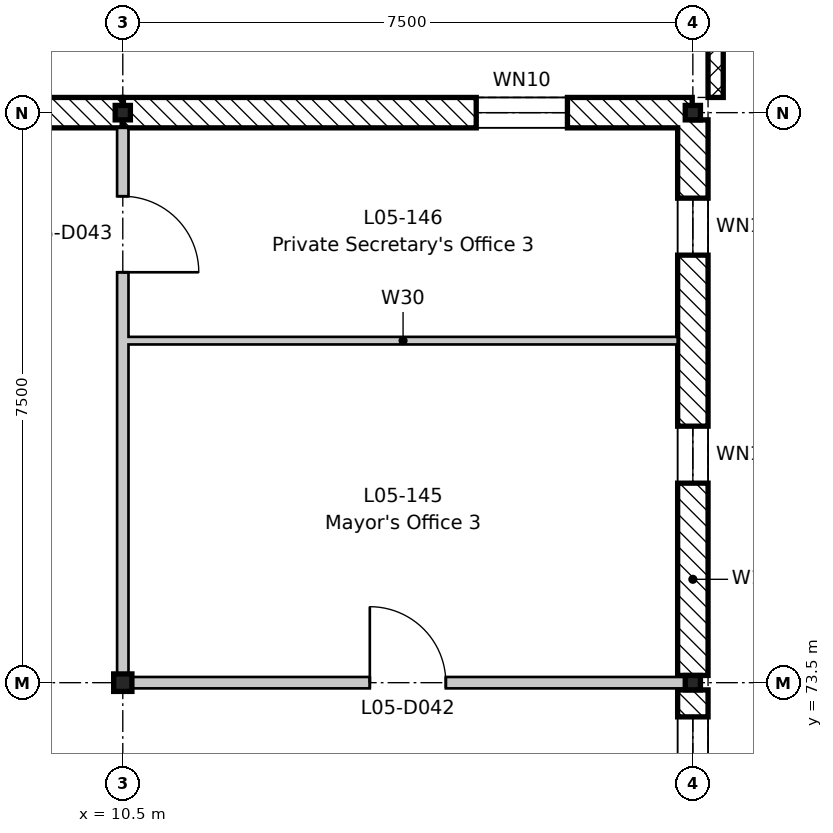
"""IFC4 building model, lengths in metres.
Left out: names, types, materials, properties, quantities, classifications, styles, units other than length and angle.
Written with IfcOpenShell. Run it as: python <this file> out.ifc"""

import sys

from ifc_helpers import new_model, si_unit, direction, frame, frame_2d, origin, origin_2d, place, context, subcontext, project, spatial, rectangle, i_section, extrude, element, fill, save


model = new_model("IFC4")
c1 = context("Model", 3, precision=1e-05, world=origin(), true_north=direction((0.0, 1.0)))
c2 = subcontext(c1, "Body", "Model", "MODEL_VIEW")
j1 = project(units=[si_unit("LENGTHUNIT", "METRE"), si_unit("PLANEANGLEUNIT", "RADIAN")], contexts=[c1])
p1 = place(None, origin())
s1 = spatial("IfcSite", under=j1, at=p1, CompositionType="ELEMENT")
p2 = place(p1, origin())
s2 = spatial("IfcBuilding", under=s1, at=p2, CompositionType="ELEMENT")
p3 = place(p2, frame((0.0, 0.0, 22.8)))
s3 = spatial("IfcBuildingStorey", under=s2, at=p3, CompositionType="ELEMENT", Elevation=22.8)
p4 = place(p3, frame((10.5, 73.5, -0.2), z_axis=(0.0, 0.0, 1.0), x_axis=(1.0, 0.0, 0.0)))
e1 = element("IfcColumn", 1, at=p4, inside=s3, PredefinedType="COLUMN", context=c2, shape_type="SweptSolid", body=[
    extrude(i_section(OverallWidth=0.24, OverallDepth=0.23, WebThickness=0.008, FlangeThickness=0.012, FilletRadius=0.021, at=origin_2d()), origin(), (0.0, 0.0, 1.0), 4.15),
])
for number, where, z_axis, x_axis in (
    (2, (10.5, 81.0, -0.2), (0.0, 0.0, 1.0), (1.0, 0.0, 0.0)),
    (3, (18.0, 73.5, -0.2), (0.0, 0.0, 1.0), (1.0, 0.0, 0.0)),
    (4, (18.0, 81.0, -0.2), (0.0, 0.0, 1.0), (1.0, 0.0, 0.0)),
):
    element("IfcColumn", number, at=place(p3, frame(where, z_axis=z_axis, x_axis=x_axis)), inside=s3, PredefinedType="COLUMN", context=c2, shape_type="SweptSolid", body=[
        extrude(i_section(OverallWidth=0.2, OverallDepth=0.19, WebThickness=0.007, FlangeThickness=0.01, FilletRadius=0.018, at=origin_2d()), origin(), (0.0, 0.0, 1.0), 4.15),
    ])
p5 = place(p3, frame((7.508, 81.0, 0.0), z_axis=(0.0, 0.0, 1.0), x_axis=(1.0, 0.0, 0.0)))
e5 = element("IfcWall", 5, at=p5, inside=s3, PredefinedType="STANDARD", context=c2, shape_type="SweptSolid", body=[
    extrude(rectangle(XDim=2.983, YDim=0.4, at=frame_2d((1.492, 0.0))), origin(), (0.0, 0.0, 1.0), 3.75),
])
p6 = place(p3, frame((10.508, 81.0, 0.0), z_axis=(0.0, 0.0, 1.0), x_axis=(1.0, 0.0, 0.0)))
e6 = element("IfcWall", 6, at=p6, inside=s3, PredefinedType="STANDARD", context=c2, shape_type="SweptSolid", body=[
    extrude(rectangle(XDim=7.483, YDim=0.4, at=frame_2d((3.742, 0.0))), origin(), (0.0, 0.0, 1.0), 3.62),
])
p7 = place(p6, frame((4.642, 0.0, 0.6)))
e7 = element("IfcOpeningElement", 7, at=p7, cuts=e6, PredefinedType="OPENING", context=c2, shape_type="SweptSolid", body=[
    extrude(rectangle(XDim=1.2, YDim=1.8, at=frame_2d((0.6, 0.9))), frame((0.0, 0.21, 0.0), z_axis=(0.0, -1.0, 0.0), x_axis=(1.0, 0.0, 0.0)), (0.0, 0.0, 1.0), 0.42),
])
p8 = place(p3, frame((18.0, 73.405, 0.0), z_axis=(0.0, 0.0, 1.0), x_axis=(0.0, -1.0, 0.0)))
e8 = element("IfcWall", 8, at=p8, inside=s3, PredefinedType="STANDARD", context=c2, shape_type="SweptSolid", body=[
    extrude(rectangle(XDim=2.81, YDim=0.4, at=frame_2d((1.405, 0.0))), origin(), (0.0, 0.0, 1.0), 3.68),
])
p9 = place(p8, frame((0.355, 0.0, 0.9)))
e9 = element("IfcOpeningElement", 9, at=p9, cuts=e8, PredefinedType="OPENING", context=c2, shape_type="SweptSolid", body=[
    extrude(rectangle(XDim=2.1, YDim=2.1, at=frame_2d((1.05, 1.05))), frame((0.0, 0.21, 0.0), z_axis=(0.0, -1.0, 0.0), x_axis=(1.0, 0.0, 0.0)), (0.0, 0.0, 1.0), 0.42),
])
p10 = place(p3, frame((18.0, 80.905, 0.0), z_axis=(0.0, 0.0, 1.0), x_axis=(0.0, -1.0, 0.0)))
e10 = element("IfcWall", 10, at=p10, inside=s3, PredefinedType="STANDARD", context=c2, shape_type="SweptSolid", body=[
    extrude(rectangle(XDim=7.31, YDim=0.4, at=frame_2d((3.655, 0.0))), origin(), (0.0, 0.0, 1.0), 3.55),
])
p11 = place(p10, frame((4.03, 0.0, 1.5)))
e11 = element("IfcOpeningElement", 11, at=p11, cuts=e10, PredefinedType="OPENING", context=c2, shape_type="SweptSolid", body=[
    extrude(rectangle(XDim=0.75, YDim=1.2, at=frame_2d((0.375, 0.6))), frame((0.0, 0.21, 0.0), z_axis=(0.0, -1.0, 0.0), x_axis=(1.0, 0.0, 0.0)), (0.0, 0.0, 1.0), 0.42),
])
p12 = place(p10, frame((1.03, 0.0, 1.5)))
e12 = element("IfcOpeningElement", 12, at=p12, cuts=e10, PredefinedType="OPENING", context=c2, shape_type="SweptSolid", body=[
    extrude(rectangle(XDim=0.75, YDim=1.2, at=frame_2d((0.375, 0.6))), frame((0.0, 0.21, 0.0), z_axis=(0.0, -1.0, 0.0), x_axis=(1.0, 0.0, 0.0)), (0.0, 0.0, 1.0), 0.42),
])
p13 = place(p3, frame((18.3, 81.2, 0.0), z_axis=(0.0, 0.0, 1.0), x_axis=(0.0, 1.0, 0.0)))
e13 = element("IfcWall", 13, at=p13, inside=s3, PredefinedType="PARAPET", context=c2, shape_type="SweptSolid", body=[
    extrude(rectangle(XDim=1.5, YDim=0.2, at=frame_2d((0.75, 0.0))), origin(), (0.0, 0.0, 1.0), 0.9),
])
p14 = place(p3, frame((10.5, 73.5, 0.0), z_axis=(0.0, 0.0, 1.0), x_axis=(0.0, 1.0, 0.0)))
e14 = element("IfcWall", 14, at=p14, inside=s3, PredefinedType="PARTITIONING", context=c2, shape_type="SweptSolid", body=[
    extrude(rectangle(XDim=7.3, YDim=0.15, at=frame_2d((3.65, 0.0))), origin(), (0.0, 0.0, 1.0), 3.43),
])
p15 = place(p14, frame((5.4, 0.0, 0.0)))
e15 = element("IfcOpeningElement", 15, at=p15, cuts=e14, PredefinedType="OPENING", context=c2, shape_type="SweptSolid", body=[
    extrude(rectangle(XDim=1.0, YDim=2.1, at=frame_2d((0.5, 1.05))), frame((0.0, 0.085, 0.0), z_axis=(0.0, -1.0, 0.0), x_axis=(1.0, 0.0, 0.0)), (0.0, 0.0, 1.0), 0.17),
])
p16 = place(p3, frame((10.575, 73.5, 0.0), z_axis=(0.0, 0.0, 1.0), x_axis=(1.0, 0.0, 0.0)))
e16 = element("IfcWall", 16, at=p16, inside=s3, PredefinedType="PARTITIONING", context=c2, shape_type="SweptSolid", body=[
    extrude(rectangle(XDim=7.425, YDim=0.15, at=frame_2d((3.712, 0.0))), origin(), (0.0, 0.0, 1.0), 3.6),
])
p17 = place(p16, frame((3.175, 0.0, 0.0)))
e17 = element("IfcOpeningElement", 17, at=p17, cuts=e16, PredefinedType="OPENING", context=c2, shape_type="SweptSolid", body=[
    extrude(rectangle(XDim=1.0, YDim=2.1, at=frame_2d((0.5, 1.05))), frame((0.0, 0.085, 0.0), z_axis=(0.0, -1.0, 0.0), x_axis=(1.0, 0.0, 0.0)), (0.0, 0.0, 1.0), 0.17),
])
p18 = place(p3, frame((10.575, 78.0, 0.0), z_axis=(0.0, 0.0, 1.0), x_axis=(1.0, 0.0, 0.0)))
e18 = element("IfcWall", 18, at=p18, inside=s3, PredefinedType="PARTITIONING", context=c2, shape_type="SweptSolid", body=[
    extrude(rectangle(XDim=7.225, YDim=0.1, at=frame_2d((3.613, 0.0))), origin(), (0.0, 0.0, 1.0), 3.95),
])
p19 = place(p7, origin())
e19 = element("IfcWindow", 19, at=p19, inside=s3, PartitioningType="SINGLE_PANEL", PredefinedType="WINDOW", context=c2, shape_type="SweptSolid", body=[
    extrude(rectangle(XDim=1.2, YDim=1.8, at=frame_2d((0.6, 0.9))), frame((0.0, 0.03, 0.0), z_axis=(0.0, -1.0, 0.0), x_axis=(1.0, 0.0, 0.0)), (0.0, 0.0, 1.0), 0.06),
])
fill(e7, e19)
p20 = place(p9, origin())
e20 = element("IfcWindow", 20, at=p20, inside=s3, PartitioningType="SINGLE_PANEL", PredefinedType="WINDOW", context=c2, shape_type="SweptSolid", body=[
    extrude(rectangle(XDim=2.1, YDim=2.1, at=frame_2d((1.05, 1.05))), frame((0.0, -0.12, 0.0), z_axis=(0.0, -1.0, 0.0), x_axis=(1.0, 0.0, 0.0)), (0.0, 0.0, 1.0), 0.06),
])
fill(e9, e20)
p21 = place(p11, origin())
e21 = element("IfcWindow", 21, at=p21, inside=s3, PartitioningType="SINGLE_PANEL", PredefinedType="WINDOW", context=c2, shape_type="SweptSolid", body=[
    extrude(rectangle(XDim=0.75, YDim=1.2, at=frame_2d((0.375, 0.6))), frame((0.0, -0.12, 0.0), z_axis=(0.0, -1.0, 0.0), x_axis=(1.0, 0.0, 0.0)), (0.0, 0.0, 1.0), 0.06),
])
fill(e11, e21)
p22 = place(p12, origin())
e22 = element("IfcWindow", 22, at=p22, inside=s3, PartitioningType="SINGLE_PANEL", PredefinedType="WINDOW", context=c2, shape_type="SweptSolid", body=[
    extrude(rectangle(XDim=0.75, YDim=1.2, at=frame_2d((0.375, 0.6))), frame((0.0, -0.12, 0.0), z_axis=(0.0, -1.0, 0.0), x_axis=(1.0, 0.0, 0.0)), (0.0, 0.0, 1.0), 0.06),
])
fill(e12, e22)
p23 = place(p17, origin())
e23 = element("IfcDoor", 23, at=p23, inside=s3, OperationType="SINGLE_SWING_LEFT", PredefinedType="DOOR", context=c2, shape_type="SweptSolid", body=[
    extrude(rectangle(XDim=1.0, YDim=2.1, at=frame_2d((0.5, 1.05))), frame((0.0, 0.025, 0.0), z_axis=(0.0, -1.0, 0.0), x_axis=(1.0, 0.0, 0.0)), (0.0, 0.0, 1.0), 0.05),
])
fill(e17, e23)
p24 = place(p15, frame((1.0, 0.0, 0.0), z_axis=(0.0, 0.0, 1.0), x_axis=(-1.0, 0.0, 0.0)))
e24 = element("IfcDoor", 24, at=p24, inside=s3, OperationType="SINGLE_SWING_RIGHT", PredefinedType="DOOR", context=c2, shape_type="SweptSolid", body=[
    extrude(rectangle(XDim=1.0, YDim=2.1, at=frame_2d((0.5, 1.05))), frame((0.0, 0.025, 0.0), z_axis=(0.0, -1.0, 0.0), x_axis=(1.0, 0.0, 0.0)), (0.0, 0.0, 1.0), 0.05),
])
fill(e15, e24)
save(model, sys.argv[1])
